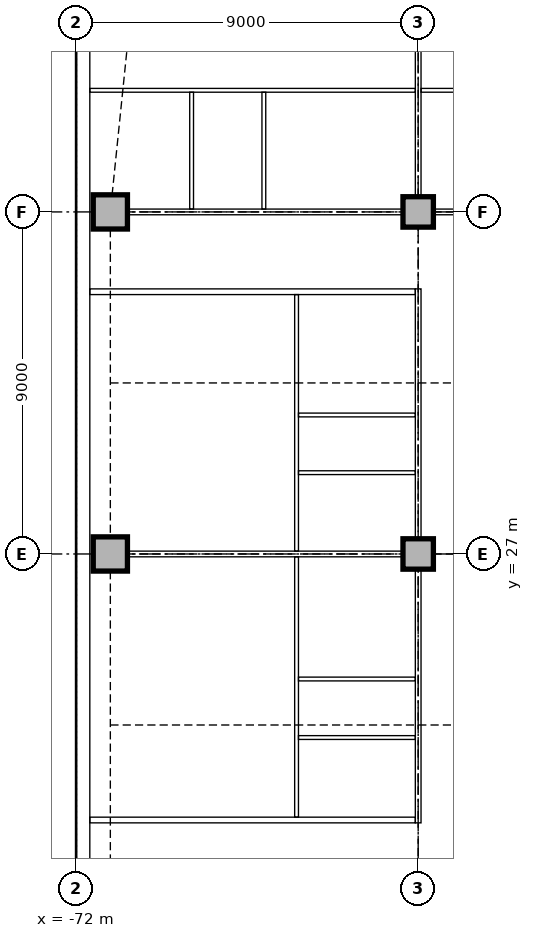
"""IFC4 building model, lengths in metres.
Left out: names, types, materials, properties, quantities, classifications, styles, units other than length and angle.
Written with IfcOpenShell. Run it as: python <this file> out.ifc"""

import sys

from ifc_helpers import new_model, si_unit, direction, frame, frame_2d, origin, origin_2d, place, context, subcontext, project, spatial, rectangle, extrude, element, fill, save


model = new_model("IFC4")
c1 = context("Model", 3, precision=1e-05, world=origin(), true_north=direction((0.0, 1.0)))
c2 = subcontext(c1, "Body", "Model", "MODEL_VIEW")
j1 = project(units=[si_unit("LENGTHUNIT", "METRE"), si_unit("PLANEANGLEUNIT", "RADIAN")], contexts=[c1])
p1 = place(None, origin())
s1 = spatial("IfcSite", under=j1, at=p1, CompositionType="ELEMENT")
p2 = place(p1, origin())
s2 = spatial("IfcBuilding", under=s1, at=p2, CompositionType="ELEMENT")
p3 = place(p2, frame((0.0, 0.0, 26.0)))
s3 = spatial("IfcBuildingStorey", under=s2, at=p3, CompositionType="ELEMENT", Elevation=26.0)
for number, where, z_axis, x_axis in (
    (1, (-71.1, 27.0, 0.0), (0.0, 0.0, 1.0), (1.0, 0.0, 0.0)),
    (2, (-71.1, 36.0, 0.0), (0.0, 0.0, 1.0), (1.0, 0.0, 0.0)),
):
    element("IfcColumn", number, at=place(p3, frame(where, z_axis=z_axis, x_axis=x_axis)), inside=s3, PredefinedType="COLUMN", context=c2, shape_type="SweptSolid", body=[
        extrude(rectangle(XDim=0.9, YDim=0.9, at=origin_2d()), origin(), (0.0, 0.0, 1.0), 3.85),
    ])
for number, where, z_axis, x_axis in (
    (3, (-63.0, 27.0, 0.0), (0.0, 0.0, 1.0), (1.0, 0.0, 0.0)),
    (4, (-63.0, 36.0, 0.0), (0.0, 0.0, 1.0), (1.0, 0.0, 0.0)),
):
    element("IfcColumn", number, at=place(p3, frame(where, z_axis=z_axis, x_axis=x_axis)), inside=s3, PredefinedType="COLUMN", context=c2, shape_type="SweptSolid", body=[
        extrude(rectangle(XDim=0.8, YDim=0.8, at=origin_2d()), origin(), (0.0, 0.0, 1.0), 3.85),
    ])
p4 = place(p3, frame((-71.82, 40.757, 0.0), z_axis=(0.0, 0.0, 1.0), x_axis=(0.0, -1.0, 0.0)))
e5 = element("IfcWall", 5, at=p4, inside=s3, PredefinedType="STANDARD", context=c2, shape_type="SweptSolid", body=[
    extrude(rectangle(XDim=26.015, YDim=0.36, at=frame_2d((13.007, 0.0))), origin(), (0.0, 0.0, 1.0), 3.85),
])
p5 = place(p4, frame((2.357, 0.0, 0.9)))
e6 = element("IfcOpeningElement", 6, at=p5, cuts=e5, PredefinedType="OPENING", context=c2, shape_type="SweptSolid", body=[
    extrude(rectangle(XDim=3.3, YDim=1.6, at=frame_2d((1.65, 0.8))), frame((0.0, 0.19, 0.0), z_axis=(0.0, -1.0, 0.0), x_axis=(1.0, 0.0, 0.0)), (0.0, 0.0, 1.0), 0.38),
])
p6 = place(p4, frame((7.057, 0.0, 0.9)))
e7 = element("IfcOpeningElement", 7, at=p6, cuts=e5, PredefinedType="OPENING", context=c2, shape_type="SweptSolid", body=[
    extrude(rectangle(XDim=3.3, YDim=1.6, at=frame_2d((1.65, 0.8))), frame((0.0, 0.19, 0.0), z_axis=(0.0, -1.0, 0.0), x_axis=(1.0, 0.0, 0.0)), (0.0, 0.0, 1.0), 0.38),
])
p7 = place(p4, frame((11.357, 0.0, 0.9)))
e8 = element("IfcOpeningElement", 8, at=p7, cuts=e5, PredefinedType="OPENING", context=c2, shape_type="SweptSolid", body=[
    extrude(rectangle(XDim=3.3, YDim=1.6, at=frame_2d((1.65, 0.8))), frame((0.0, 0.19, 0.0), z_axis=(0.0, -1.0, 0.0), x_axis=(1.0, 0.0, 0.0)), (0.0, 0.0, 1.0), 0.38),
])
p8 = place(p4, frame((15.857, 0.0, 0.9)))
e9 = element("IfcOpeningElement", 9, at=p8, cuts=e5, PredefinedType="OPENING", context=c2, shape_type="SweptSolid", body=[
    extrude(rectangle(XDim=3.3, YDim=1.6, at=frame_2d((1.65, 0.8))), frame((0.0, 0.19, 0.0), z_axis=(0.0, -1.0, 0.0), x_axis=(1.0, 0.0, 0.0)), (0.0, 0.0, 1.0), 0.38),
])
p9 = place(p4, frame((20.957, 0.0, 0.9)))
e10 = element("IfcOpeningElement", 10, at=p9, cuts=e5, PredefinedType="OPENING", context=c2, shape_type="SweptSolid", body=[
    extrude(rectangle(XDim=3.3, YDim=1.6, at=frame_2d((1.65, 0.8))), frame((0.0, 0.19, 0.0), z_axis=(0.0, -1.0, 0.0), x_axis=(1.0, 0.0, 0.0)), (0.0, 0.0, 1.0), 0.38),
])
p10 = place(p3, frame((-62.6, 36.0, 0.0), z_axis=(0.0, 0.0, 1.0), x_axis=(1.0, 0.0, 0.0)))
e11 = element("IfcWall", 11, at=p10, inside=s3, PredefinedType="PARTITIONING", context=c2, shape_type="SweptSolid", body=[
    extrude(rectangle(XDim=8.2, YDim=0.15, at=frame_2d((4.1, 0.0))), origin(), (0.0, 0.0, 1.0), 3.15),
])
p11 = place(p10, frame((2.89, 0.0, 0.0)))
e12 = element("IfcOpeningElement", 12, at=p11, cuts=e11, PredefinedType="OPENING", context=c2, shape_type="SweptSolid", body=[
    extrude(rectangle(XDim=1.0, YDim=2.1, at=frame_2d((0.5, 1.05))), frame((0.0, 0.085, 0.0), z_axis=(0.0, -1.0, 0.0), x_axis=(1.0, 0.0, 0.0)), (0.0, 0.0, 1.0), 0.17),
])
p12 = place(p3, frame((-70.65, 36.0, 0.0), z_axis=(0.0, 0.0, 1.0), x_axis=(1.0, 0.0, 0.0)))
e13 = element("IfcWall", 13, at=p12, inside=s3, PredefinedType="PARTITIONING", context=c2, shape_type="SweptSolid", body=[
    extrude(rectangle(XDim=7.25, YDim=0.15, at=frame_2d((3.625, 0.0))), origin(), (0.0, 0.0, 1.0), 3.15),
])
p13 = place(p12, frame((2.138, 0.0, 0.0)))
e14 = element("IfcOpeningElement", 14, at=p13, cuts=e13, PredefinedType="OPENING", context=c2, shape_type="SweptSolid", body=[
    extrude(rectangle(XDim=1.0, YDim=2.1, at=frame_2d((0.5, 1.05))), frame((0.0, 0.085, 0.0), z_axis=(0.0, -1.0, 0.0), x_axis=(1.0, 0.0, 0.0)), (0.0, 0.0, 1.0), 0.17),
])
p14 = place(p3, frame((-63.0, 19.925, 0.0), z_axis=(0.0, 0.0, 1.0), x_axis=(0.0, 1.0, 0.0)))
e15 = element("IfcWall", 15, at=p14, inside=s3, PredefinedType="PARTITIONING", context=c2, shape_type="SweptSolid", body=[
    extrude(rectangle(XDim=6.675, YDim=0.15, at=frame_2d((3.337, 0.0))), origin(), (0.0, 0.0, 1.0), 3.158),
])
p15 = place(p14, frame((2.495, 0.0, 0.0)))
e16 = element("IfcOpeningElement", 16, at=p15, cuts=e15, PredefinedType="OPENING", context=c2, shape_type="SweptSolid", body=[
    extrude(rectangle(XDim=1.0, YDim=2.1, at=frame_2d((0.5, 1.05))), frame((0.0, 0.085, 0.0), z_axis=(0.0, -1.0, 0.0), x_axis=(1.0, 0.0, 0.0)), (0.0, 0.0, 1.0), 0.17),
])
p16 = place(p3, frame((-63.0, 27.4, 0.0), z_axis=(0.0, 0.0, 1.0), x_axis=(0.0, 1.0, 0.0)))
e17 = element("IfcWall", 17, at=p16, inside=s3, PredefinedType="PARTITIONING", context=c2, shape_type="SweptSolid", body=[
    extrude(rectangle(XDim=6.575, YDim=0.15, at=frame_2d((3.288, 0.0))), origin(), (0.0, 0.0, 1.0), 3.158),
])
p17 = place(p16, frame((1.989, 0.0, 0.0)))
e18 = element("IfcOpeningElement", 18, at=p17, cuts=e17, PredefinedType="OPENING", context=c2, shape_type="SweptSolid", body=[
    extrude(rectangle(XDim=1.0, YDim=2.1, at=frame_2d((0.5, 1.05))), frame((0.0, 0.085, 0.0), z_axis=(0.0, -1.0, 0.0), x_axis=(1.0, 0.0, 0.0)), (0.0, 0.0, 1.0), 0.17),
])
for number, where, z_axis, x_axis in (
    (19, (-71.64, 20.0, 0.0), (0.0, 0.0, 1.0), (1.0, 0.0, 0.0)),
    (20, (-71.64, 33.9, 0.0), (0.0, 0.0, 1.0), (1.0, 0.0, 0.0)),
):
    element("IfcWall", number, at=place(p3, frame(where, z_axis=z_axis, x_axis=x_axis)), inside=s3, PredefinedType="PARTITIONING", context=c2, shape_type="SweptSolid", body=[
        extrude(rectangle(XDim=8.565, YDim=0.15, at=frame_2d((4.282, 0.0))), origin(), (0.0, 0.0, 1.0), 3.85),
    ])
p18 = place(p3, frame((-70.65, 27.0, 0.0), z_axis=(0.0, 0.0, 1.0), x_axis=(1.0, 0.0, 0.0)))
e21 = element("IfcWall", 21, at=p18, inside=s3, PredefinedType="PARTITIONING", context=c2, shape_type="SweptSolid", body=[
    extrude(rectangle(XDim=7.25, YDim=0.15, at=frame_2d((3.625, 0.0))), origin(), (0.0, 0.0, 1.0), 3.15),
])
p19 = place(p3, frame((-63.0, 36.4, 0.0), z_axis=(0.0, 0.0, 1.0), x_axis=(0.0, 1.0, 0.0)))
e22 = element("IfcWall", 22, at=p19, inside=s3, PredefinedType="PARTITIONING", context=c2, shape_type="SweptSolid", body=[
    extrude(rectangle(XDim=7.25, YDim=0.15, at=frame_2d((3.625, 0.0))), origin(), (0.0, 0.0, 1.0), 3.158),
])
p20 = place(p3, frame((-62.925, 39.2, 0.0), z_axis=(0.0, 0.0, 1.0), x_axis=(1.0, 0.0, 0.0)))
e23 = element("IfcWall", 23, at=p20, inside=s3, PredefinedType="PARTITIONING", context=c2, shape_type="SweptSolid", body=[
    extrude(rectangle(XDim=8.85, YDim=0.1, at=frame_2d((4.425, 0.0))), origin(), (0.0, 0.0, 1.0), 3.85),
])
p21 = place(p20, frame((3.265, 0.0, 0.0)))
e24 = element("IfcOpeningElement", 24, at=p21, cuts=e23, PredefinedType="OPENING", context=c2, shape_type="SweptSolid", body=[
    extrude(rectangle(XDim=0.9, YDim=2.1, at=frame_2d((0.45, 1.05))), frame((0.0, 0.06, 0.0), z_axis=(0.0, -1.0, 0.0), x_axis=(1.0, 0.0, 0.0)), (0.0, 0.0, 1.0), 0.12),
])
p22 = place(p3, frame((-71.64, 39.2, 0.0), z_axis=(0.0, 0.0, 1.0), x_axis=(1.0, 0.0, 0.0)))
e25 = element("IfcWall", 25, at=p22, inside=s3, PredefinedType="PARTITIONING", context=c2, shape_type="SweptSolid", body=[
    extrude(rectangle(XDim=8.565, YDim=0.1, at=frame_2d((4.282, 0.0))), origin(), (0.0, 0.0, 1.0), 3.85),
])
p23 = place(p22, frame((3.178, 0.0, 0.0)))
e26 = element("IfcOpeningElement", 26, at=p23, cuts=e25, PredefinedType="OPENING", context=c2, shape_type="SweptSolid", body=[
    extrude(rectangle(XDim=0.9, YDim=2.1, at=frame_2d((0.45, 1.05))), frame((0.0, 0.06, 0.0), z_axis=(0.0, -1.0, 0.0), x_axis=(1.0, 0.0, 0.0)), (0.0, 0.0, 1.0), 0.12),
])
p24 = place(p3, frame((-66.2, 27.075, 0.0), z_axis=(0.0, 0.0, 1.0), x_axis=(0.0, 1.0, 0.0)))
e27 = element("IfcWall", 27, at=p24, inside=s3, PredefinedType="PARTITIONING", context=c2, shape_type="SweptSolid", body=[
    extrude(rectangle(XDim=6.75, YDim=0.1, at=frame_2d((3.375, 0.0))), origin(), (0.0, 0.0, 1.0), 3.85),
])
p25 = place(p24, frame((2.364, 0.0, 0.0)))
e28 = element("IfcOpeningElement", 28, at=p25, cuts=e27, PredefinedType="OPENING", context=c2, shape_type="SweptSolid", body=[
    extrude(rectangle(XDim=0.9, YDim=2.1, at=frame_2d((0.45, 1.05))), frame((0.0, 0.06, 0.0), z_axis=(0.0, -1.0, 0.0), x_axis=(1.0, 0.0, 0.0)), (0.0, 0.0, 1.0), 0.12),
])
p26 = place(p3, frame((-66.2, 20.075, 0.0), z_axis=(0.0, 0.0, 1.0), x_axis=(0.0, 1.0, 0.0)))
e29 = element("IfcWall", 29, at=p26, inside=s3, PredefinedType="PARTITIONING", context=c2, shape_type="SweptSolid", body=[
    extrude(rectangle(XDim=6.85, YDim=0.1, at=frame_2d((3.425, 0.0))), origin(), (0.0, 0.0, 1.0), 3.85),
])
p27 = place(p26, frame((2.395, 0.0, 0.0)))
e30 = element("IfcOpeningElement", 30, at=p27, cuts=e29, PredefinedType="OPENING", context=c2, shape_type="SweptSolid", body=[
    extrude(rectangle(XDim=0.9, YDim=2.1, at=frame_2d((0.45, 1.05))), frame((0.0, 0.06, 0.0), z_axis=(0.0, -1.0, 0.0), x_axis=(1.0, 0.0, 0.0)), (0.0, 0.0, 1.0), 0.12),
])
p28 = place(p3, frame((-66.15, 22.17, 0.0), z_axis=(0.0, 0.0, 1.0), x_axis=(1.0, 0.0, 0.0)))
e31 = element("IfcWall", 31, at=p28, inside=s3, PredefinedType="PARTITIONING", context=c2, shape_type="SweptSolid", body=[
    extrude(rectangle(XDim=3.075, YDim=0.1, at=frame_2d((1.538, 0.0))), origin(), (0.0, 0.0, 1.0), 3.85),
])
p29 = place(p28, frame((1.1, 0.0, 0.0)))
e32 = element("IfcOpeningElement", 32, at=p29, cuts=e31, PredefinedType="OPENING", context=c2, shape_type="SweptSolid", body=[
    extrude(rectangle(XDim=0.9, YDim=2.1, at=frame_2d((0.45, 1.05))), frame((0.0, 0.06, 0.0), z_axis=(0.0, -1.0, 0.0), x_axis=(1.0, 0.0, 0.0)), (0.0, 0.0, 1.0), 0.12),
])
p30 = place(p3, frame((-66.15, 23.71, 0.0), z_axis=(0.0, 0.0, 1.0), x_axis=(1.0, 0.0, 0.0)))
e33 = element("IfcWall", 33, at=p30, inside=s3, PredefinedType="PARTITIONING", context=c2, shape_type="SweptSolid", body=[
    extrude(rectangle(XDim=3.075, YDim=0.1, at=frame_2d((1.538, 0.0))), origin(), (0.0, 0.0, 1.0), 3.85),
])
p31 = place(p30, frame((1.1, 0.0, 0.0)))
e34 = element("IfcOpeningElement", 34, at=p31, cuts=e33, PredefinedType="OPENING", context=c2, shape_type="SweptSolid", body=[
    extrude(rectangle(XDim=0.9, YDim=2.1, at=frame_2d((0.45, 1.05))), frame((0.0, 0.06, 0.0), z_axis=(0.0, -1.0, 0.0), x_axis=(1.0, 0.0, 0.0)), (0.0, 0.0, 1.0), 0.12),
])
p32 = place(p3, frame((-66.15, 29.139, 0.0), z_axis=(0.0, 0.0, 1.0), x_axis=(1.0, 0.0, 0.0)))
e35 = element("IfcWall", 35, at=p32, inside=s3, PredefinedType="PARTITIONING", context=c2, shape_type="SweptSolid", body=[
    extrude(rectangle(XDim=3.075, YDim=0.1, at=frame_2d((1.538, 0.0))), origin(), (0.0, 0.0, 1.0), 3.85),
])
p33 = place(p32, frame((1.1, 0.0, 0.0)))
e36 = element("IfcOpeningElement", 36, at=p33, cuts=e35, PredefinedType="OPENING", context=c2, shape_type="SweptSolid", body=[
    extrude(rectangle(XDim=0.9, YDim=2.1, at=frame_2d((0.45, 1.05))), frame((0.0, 0.06, 0.0), z_axis=(0.0, -1.0, 0.0), x_axis=(1.0, 0.0, 0.0)), (0.0, 0.0, 1.0), 0.12),
])
p34 = place(p3, frame((-66.15, 30.657, 0.0), z_axis=(0.0, 0.0, 1.0), x_axis=(1.0, 0.0, 0.0)))
e37 = element("IfcWall", 37, at=p34, inside=s3, PredefinedType="PARTITIONING", context=c2, shape_type="SweptSolid", body=[
    extrude(rectangle(XDim=3.075, YDim=0.1, at=frame_2d((1.538, 0.0))), origin(), (0.0, 0.0, 1.0), 3.85),
])
p35 = place(p34, frame((1.1, 0.0, 0.0)))
e38 = element("IfcOpeningElement", 38, at=p35, cuts=e37, PredefinedType="OPENING", context=c2, shape_type="SweptSolid", body=[
    extrude(rectangle(XDim=0.9, YDim=2.1, at=frame_2d((0.45, 1.05))), frame((0.0, 0.06, 0.0), z_axis=(0.0, -1.0, 0.0), x_axis=(1.0, 0.0, 0.0)), (0.0, 0.0, 1.0), 0.12),
])
p36 = place(p3, frame((-68.962, 36.075, 0.0), z_axis=(0.0, 0.0, 1.0), x_axis=(0.0, 1.0, 0.0)))
e39 = element("IfcWall", 39, at=p36, inside=s3, PredefinedType="PARTITIONING", context=c2, shape_type="SweptSolid", body=[
    extrude(rectangle(XDim=3.075, YDim=0.1, at=frame_2d((1.538, 0.0))), origin(), (0.0, 0.0, 1.0), 3.85),
])
p37 = place(p36, frame((1.1, 0.0, 0.0)))
e40 = element("IfcOpeningElement", 40, at=p37, cuts=e39, PredefinedType="OPENING", context=c2, shape_type="SweptSolid", body=[
    extrude(rectangle(XDim=0.9, YDim=2.1, at=frame_2d((0.45, 1.05))), frame((0.0, 0.06, 0.0), z_axis=(0.0, -1.0, 0.0), x_axis=(1.0, 0.0, 0.0)), (0.0, 0.0, 1.0), 0.12),
])
p38 = place(p3, frame((-67.061, 36.075, 0.0), z_axis=(0.0, 0.0, 1.0), x_axis=(0.0, 1.0, 0.0)))
e41 = element("IfcWall", 41, at=p38, inside=s3, PredefinedType="PARTITIONING", context=c2, shape_type="SweptSolid", body=[
    extrude(rectangle(XDim=3.075, YDim=0.1, at=frame_2d((1.538, 0.0))), origin(), (0.0, 0.0, 1.0), 3.85),
])
p39 = place(p38, frame((1.1, 0.0, 0.0)))
e42 = element("IfcOpeningElement", 42, at=p39, cuts=e41, PredefinedType="OPENING", context=c2, shape_type="SweptSolid", body=[
    extrude(rectangle(XDim=0.9, YDim=2.1, at=frame_2d((0.45, 1.05))), frame((0.0, 0.06, 0.0), z_axis=(0.0, -1.0, 0.0), x_axis=(1.0, 0.0, 0.0)), (0.0, 0.0, 1.0), 0.12),
])
p40 = place(p5, origin())
e43 = element("IfcWindow", 43, at=p40, inside=s3, PartitioningType="SINGLE_PANEL", PredefinedType="WINDOW", context=c2, shape_type="SweptSolid", body=[
    extrude(rectangle(XDim=3.3, YDim=1.6, at=frame_2d((1.65, 0.8))), frame((0.0, 0.13, 0.0), z_axis=(0.0, -1.0, 0.0), x_axis=(1.0, 0.0, 0.0)), (0.0, 0.0, 1.0), 0.06),
])
fill(e6, e43)
p41 = place(p6, origin())
e44 = element("IfcWindow", 44, at=p41, inside=s3, PartitioningType="SINGLE_PANEL", PredefinedType="WINDOW", context=c2, shape_type="SweptSolid", body=[
    extrude(rectangle(XDim=3.3, YDim=1.6, at=frame_2d((1.65, 0.8))), frame((0.0, 0.13, 0.0), z_axis=(0.0, -1.0, 0.0), x_axis=(1.0, 0.0, 0.0)), (0.0, 0.0, 1.0), 0.06),
])
fill(e7, e44)
p42 = place(p7, origin())
e45 = element("IfcWindow", 45, at=p42, inside=s3, PartitioningType="SINGLE_PANEL", PredefinedType="WINDOW", context=c2, shape_type="SweptSolid", body=[
    extrude(rectangle(XDim=3.3, YDim=1.6, at=frame_2d((1.65, 0.8))), frame((0.0, 0.13, 0.0), z_axis=(0.0, -1.0, 0.0), x_axis=(1.0, 0.0, 0.0)), (0.0, 0.0, 1.0), 0.06),
])
fill(e8, e45)
p43 = place(p8, origin())
e46 = element("IfcWindow", 46, at=p43, inside=s3, PartitioningType="SINGLE_PANEL", PredefinedType="WINDOW", context=c2, shape_type="SweptSolid", body=[
    extrude(rectangle(XDim=3.3, YDim=1.6, at=frame_2d((1.65, 0.8))), frame((0.0, 0.13, 0.0), z_axis=(0.0, -1.0, 0.0), x_axis=(1.0, 0.0, 0.0)), (0.0, 0.0, 1.0), 0.06),
])
fill(e9, e46)
p44 = place(p9, origin())
e47 = element("IfcWindow", 47, at=p44, inside=s3, PartitioningType="SINGLE_PANEL", PredefinedType="WINDOW", context=c2, shape_type="SweptSolid", body=[
    extrude(rectangle(XDim=3.3, YDim=1.6, at=frame_2d((1.65, 0.8))), frame((0.0, 0.13, 0.0), z_axis=(0.0, -1.0, 0.0), x_axis=(1.0, 0.0, 0.0)), (0.0, 0.0, 1.0), 0.06),
])
fill(e10, e47)
p45 = place(p37, origin())
e48 = element("IfcDoor", 48, at=p45, inside=s3, OperationType="SINGLE_SWING_LEFT", PredefinedType="DOOR", context=c2, shape_type="SweptSolid", body=[
    extrude(rectangle(XDim=0.9, YDim=2.1, at=frame_2d((0.45, 1.05))), frame((0.0, 0.025, 0.0), z_axis=(0.0, -1.0, 0.0), x_axis=(1.0, 0.0, 0.0)), (0.0, 0.0, 1.0), 0.05),
])
fill(e40, e48)
p46 = place(p39, origin())
e49 = element("IfcDoor", 49, at=p46, inside=s3, OperationType="SINGLE_SWING_RIGHT", PredefinedType="DOOR", context=c2, shape_type="SweptSolid", body=[
    extrude(rectangle(XDim=0.9, YDim=2.1, at=frame_2d((0.45, 1.05))), frame((0.0, 0.025, 0.0), z_axis=(0.0, -1.0, 0.0), x_axis=(1.0, 0.0, 0.0)), (0.0, 0.0, 1.0), 0.05),
])
fill(e42, e49)
p47 = place(p23, frame((0.9, 0.0, 0.0), z_axis=(0.0, 0.0, 1.0), x_axis=(-1.0, 0.0, 0.0)))
e50 = element("IfcDoor", 50, at=p47, inside=s3, OperationType="SINGLE_SWING_RIGHT", PredefinedType="DOOR", context=c2, shape_type="SweptSolid", body=[
    extrude(rectangle(XDim=0.9, YDim=2.1, at=frame_2d((0.45, 1.05))), frame((0.0, 0.025, 0.0), z_axis=(0.0, -1.0, 0.0), x_axis=(1.0, 0.0, 0.0)), (0.0, 0.0, 1.0), 0.05),
])
fill(e26, e50)
p48 = place(p13, origin())
e51 = element("IfcDoor", 51, at=p48, inside=s3, OperationType="SINGLE_SWING_LEFT", PredefinedType="DOOR", context=c2, shape_type="SweptSolid", body=[
    extrude(rectangle(XDim=1.0, YDim=2.1, at=frame_2d((0.5, 1.05))), frame((0.0, 0.025, 0.0), z_axis=(0.0, -1.0, 0.0), x_axis=(1.0, 0.0, 0.0)), (0.0, 0.0, 1.0), 0.05),
])
fill(e14, e51)
p49 = place(p29, frame((0.9, 0.0, 0.0), z_axis=(0.0, 0.0, 1.0), x_axis=(-1.0, 0.0, 0.0)))
e52 = element("IfcDoor", 52, at=p49, inside=s3, OperationType="SINGLE_SWING_RIGHT", PredefinedType="DOOR", context=c2, shape_type="SweptSolid", body=[
    extrude(rectangle(XDim=0.9, YDim=2.1, at=frame_2d((0.45, 1.05))), frame((0.0, 0.025, 0.0), z_axis=(0.0, -1.0, 0.0), x_axis=(1.0, 0.0, 0.0)), (0.0, 0.0, 1.0), 0.05),
])
fill(e32, e52)
p50 = place(p31, frame((0.9, 0.0, 0.0), z_axis=(0.0, 0.0, 1.0), x_axis=(-1.0, 0.0, 0.0)))
e53 = element("IfcDoor", 53, at=p50, inside=s3, OperationType="SINGLE_SWING_RIGHT", PredefinedType="DOOR", context=c2, shape_type="SweptSolid", body=[
    extrude(rectangle(XDim=0.9, YDim=2.1, at=frame_2d((0.45, 1.05))), frame((0.0, 0.025, 0.0), z_axis=(0.0, -1.0, 0.0), x_axis=(1.0, 0.0, 0.0)), (0.0, 0.0, 1.0), 0.05),
])
fill(e34, e53)
p51 = place(p27, frame((0.9, 0.0, 0.0), z_axis=(0.0, 0.0, 1.0), x_axis=(-1.0, 0.0, 0.0)))
e54 = element("IfcDoor", 54, at=p51, inside=s3, OperationType="SINGLE_SWING_RIGHT", PredefinedType="DOOR", context=c2, shape_type="SweptSolid", body=[
    extrude(rectangle(XDim=0.9, YDim=2.1, at=frame_2d((0.45, 1.05))), frame((0.0, 0.025, 0.0), z_axis=(0.0, -1.0, 0.0), x_axis=(1.0, 0.0, 0.0)), (0.0, 0.0, 1.0), 0.05),
])
fill(e30, e54)
p52 = place(p15, origin())
e55 = element("IfcDoor", 55, at=p52, inside=s3, OperationType="SINGLE_SWING_LEFT", PredefinedType="DOOR", context=c2, shape_type="SweptSolid", body=[
    extrude(rectangle(XDim=1.0, YDim=2.1, at=frame_2d((0.5, 1.05))), frame((0.0, 0.025, 0.0), z_axis=(0.0, -1.0, 0.0), x_axis=(1.0, 0.0, 0.0)), (0.0, 0.0, 1.0), 0.05),
])
fill(e16, e55)
p53 = place(p33, frame((0.9, 0.0, 0.0), z_axis=(0.0, 0.0, 1.0), x_axis=(-1.0, 0.0, 0.0)))
e56 = element("IfcDoor", 56, at=p53, inside=s3, OperationType="SINGLE_SWING_LEFT", PredefinedType="DOOR", context=c2, shape_type="SweptSolid", body=[
    extrude(rectangle(XDim=0.9, YDim=2.1, at=frame_2d((0.45, 1.05))), frame((0.0, 0.025, 0.0), z_axis=(0.0, -1.0, 0.0), x_axis=(1.0, 0.0, 0.0)), (0.0, 0.0, 1.0), 0.05),
])
fill(e36, e56)
p54 = place(p35, frame((0.9, 0.0, 0.0), z_axis=(0.0, 0.0, 1.0), x_axis=(-1.0, 0.0, 0.0)))
e57 = element("IfcDoor", 57, at=p54, inside=s3, OperationType="SINGLE_SWING_LEFT", PredefinedType="DOOR", context=c2, shape_type="SweptSolid", body=[
    extrude(rectangle(XDim=0.9, YDim=2.1, at=frame_2d((0.45, 1.05))), frame((0.0, 0.025, 0.0), z_axis=(0.0, -1.0, 0.0), x_axis=(1.0, 0.0, 0.0)), (0.0, 0.0, 1.0), 0.05),
])
fill(e38, e57)
p55 = place(p25, frame((0.9, 0.0, 0.0), z_axis=(0.0, 0.0, 1.0), x_axis=(-1.0, 0.0, 0.0)))
e58 = element("IfcDoor", 58, at=p55, inside=s3, OperationType="SINGLE_SWING_RIGHT", PredefinedType="DOOR", context=c2, shape_type="SweptSolid", body=[
    extrude(rectangle(XDim=0.9, YDim=2.1, at=frame_2d((0.45, 1.05))), frame((0.0, 0.025, 0.0), z_axis=(0.0, -1.0, 0.0), x_axis=(1.0, 0.0, 0.0)), (0.0, 0.0, 1.0), 0.05),
])
fill(e28, e58)
p56 = place(p17, origin())
e59 = element("IfcDoor", 59, at=p56, inside=s3, OperationType="SINGLE_SWING_RIGHT", PredefinedType="DOOR", context=c2, shape_type="SweptSolid", body=[
    extrude(rectangle(XDim=1.0, YDim=2.1, at=frame_2d((0.5, 1.05))), frame((0.0, 0.025, 0.0), z_axis=(0.0, -1.0, 0.0), x_axis=(1.0, 0.0, 0.0)), (0.0, 0.0, 1.0), 0.05),
])
fill(e18, e59)
save(model, sys.argv[1])
